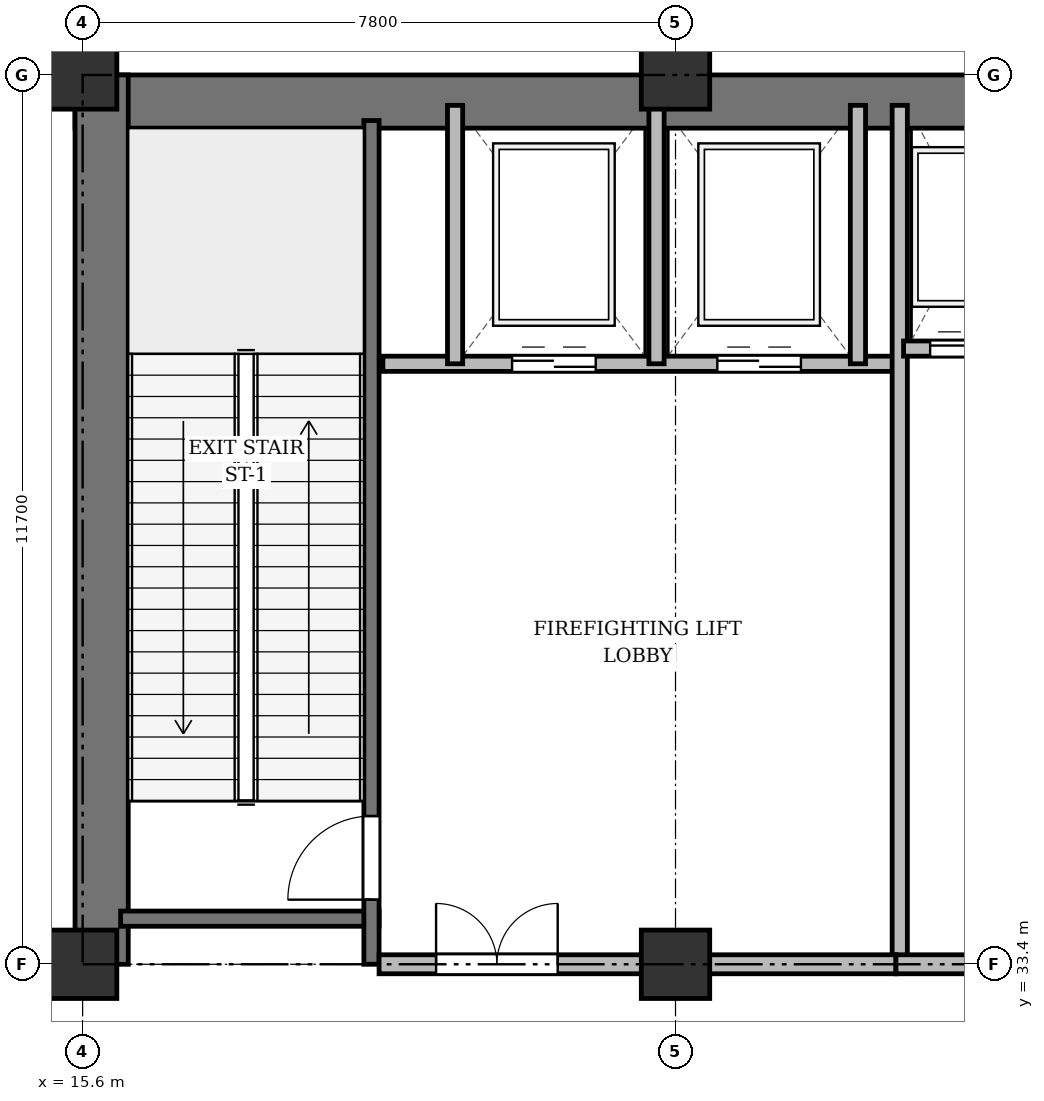
"""IFC4 building model, lengths in metres.
Left out: names, types, materials, properties, quantities, classifications, styles, units other than length and angle.
Written with IfcOpenShell. Run it as: python <this file> out.ifc"""

import sys

from ifc_helpers import new_model, si_unit, direction, frame, frame_2d, origin, origin_2d, place, context, subcontext, project, spatial, rectangle, extrude, source, transform, mapped, element, fill, save


model = new_model("IFC4")
c1 = context("Model", 3, precision=1e-05, world=origin(), true_north=direction((0.0, 1.0)))
c2 = subcontext(c1, "Body", "Model", "MODEL_VIEW")
j1 = project(units=[si_unit("LENGTHUNIT", "METRE"), si_unit("PLANEANGLEUNIT", "RADIAN")], contexts=[c1])
p1 = place(None, origin())
s1 = spatial("IfcSite", under=j1, at=p1, CompositionType="ELEMENT")
p2 = place(p1, origin())
s2 = spatial("IfcBuilding", under=s1, at=p2, CompositionType="ELEMENT")
p3 = place(p2, frame((0.0, 0.0, 73.9)))
s3 = spatial("IfcBuildingStorey", under=s2, at=p3, CompositionType="ELEMENT", Elevation=73.9)
m1 = source(origin(), c2, "Body", "SweptSolid", [
    extrude(rectangle(XDim=0.9, YDim=0.9, at=origin_2d()), origin(), (0.0, 0.0, 1.0), 7.8),
])
for number, where, z_axis, x_axis in (
    (1, (15.6, 33.4, 0.0), (0.0, 0.0, 1.0), (1.0, 0.0, 0.0)),
    (2, (15.6, 45.1, 0.0), (0.0, 0.0, 1.0), (1.0, 0.0, 0.0)),
    (3, (23.4, 33.4, 0.0), (0.0, 0.0, 1.0), (1.0, 0.0, 0.0)),
    (4, (23.4, 45.1, 0.0), (0.0, 0.0, 1.0), (1.0, 0.0, 0.0)),
):
    element("IfcColumn", number, at=place(p3, frame(where, z_axis=z_axis, x_axis=x_axis)), inside=s3, PredefinedType="COLUMN", context=c2, shape_type="MappedRepresentation", body=[
        mapped(m1, transform((0.0, 0.0, 0.0), x_axis=(1.0, 0.0, 0.0), y_axis=(0.0, 1.0, 0.0), z_axis=(0.0, 0.0, 1.0), scale=1.0)),
    ])
p4 = place(p3, frame((15.5, 44.75, 0.0), z_axis=(0.0, 0.0, 1.0), x_axis=(1.0, 0.0, 0.0)))
e5 = element("IfcWall", 5, at=p4, inside=s3, PredefinedType="SHEAR", context=c2, shape_type="SweptSolid", body=[
    extrude(rectangle(XDim=43.4, YDim=0.7, at=frame_2d((21.7, 0.0))), origin(), (0.0, 0.0, 1.0), 7.42),
])
p5 = place(p3, frame((15.85, 33.4, 0.0), z_axis=(0.0, 0.0, 1.0), x_axis=(0.0, 1.0, 0.0)))
e6 = element("IfcWall", 6, at=p5, inside=s3, PredefinedType="SHEAR", context=c2, shape_type="SweptSolid", body=[
    extrude(rectangle(XDim=11.7, YDim=0.7, at=frame_2d((5.85, 0.0))), origin(), (0.0, 0.0, 1.0), 7.42),
])
p6 = place(p3, frame((16.1, 34.0, 0.0), z_axis=(0.0, 0.0, 1.0), x_axis=(1.0, 0.0, 0.0)))
e7 = element("IfcWall", 7, at=p6, inside=s3, PredefinedType="SHEAR", context=c2, shape_type="SweptSolid", body=[
    extrude(rectangle(XDim=3.4, YDim=0.2, at=frame_2d((1.7, 0.0))), origin(), (0.0, 0.0, 1.0), 7.42),
])
p7 = place(p3, frame((19.4, 33.4, 0.0), z_axis=(0.0, 0.0, 1.0), x_axis=(0.0, 1.0, 0.0)))
e8 = element("IfcWall", 8, at=p7, inside=s3, PredefinedType="SHEAR", context=c2, shape_type="SweptSolid", body=[
    extrude(rectangle(XDim=11.1, YDim=0.2, at=frame_2d((5.55, 0.0))), origin(), (0.0, 0.0, 1.0), 7.42),
])
p8 = place(p7, frame((0.85, 0.0, 0.0)))
e9 = element("IfcOpeningElement", 9, at=p8, cuts=e8, PredefinedType="OPENING", context=c2, shape_type="SweptSolid", body=[
    extrude(rectangle(XDim=1.1, YDim=2.15, at=frame_2d((0.55, 1.075))), frame((0.0, 0.11, 0.0), z_axis=(0.0, -1.0, 0.0), x_axis=(1.0, 0.0, 0.0)), (0.0, 0.0, 1.0), 0.22),
])
p9 = place(p3, frame((19.55, 41.3, 0.0), z_axis=(0.0, 0.0, 1.0), x_axis=(1.0, 0.0, 0.0)))
e10 = element("IfcWall", 10, at=p9, inside=s3, PredefinedType="SOLIDWALL", context=c2, shape_type="SweptSolid", body=[
    extrude(rectangle(XDim=6.75, YDim=0.2, at=frame_2d((3.375, 0.0))), origin(), (0.0, 0.0, 1.0), 7.42),
])
p10 = place(p9, frame((1.7, 0.0, 0.0)))
e11 = element("IfcOpeningElement", 11, at=p10, cuts=e10, PredefinedType="OPENING", context=c2, shape_type="SweptSolid", body=[
    extrude(rectangle(XDim=1.1, YDim=2.15, at=frame_2d((0.55, 1.075))), frame((0.0, 0.11, 0.0), z_axis=(0.0, -1.0, 0.0), x_axis=(1.0, 0.0, 0.0)), (0.0, 0.0, 1.0), 0.22),
])
p11 = place(p9, frame((4.4, 0.0, 0.0)))
e12 = element("IfcOpeningElement", 12, at=p11, cuts=e10, PredefinedType="OPENING", context=c2, shape_type="SweptSolid", body=[
    extrude(rectangle(XDim=1.1, YDim=2.15, at=frame_2d((0.55, 1.075))), frame((0.0, 0.11, 0.0), z_axis=(0.0, -1.0, 0.0), x_axis=(1.0, 0.0, 0.0)), (0.0, 0.0, 1.0), 0.22),
])
for number, where, z_axis, x_axis in (
    (13, (20.5, 41.3, 0.0), (0.0, 0.0, 1.0), (0.0, 1.0, 0.0)),
    (14, (23.15, 41.3, 0.0), (0.0, 0.0, 1.0), (0.0, 1.0, 0.0)),
    (15, (25.8, 41.3, 0.0), (0.0, 0.0, 1.0), (0.0, 1.0, 0.0)),
):
    element("IfcWall", number, at=place(p3, frame(where, z_axis=z_axis, x_axis=x_axis)), inside=s3, PredefinedType="SOLIDWALL", context=c2, shape_type="SweptSolid", body=[
        extrude(rectangle(XDim=3.4, YDim=0.2, at=frame_2d((1.7, 0.0))), origin(), (0.0, 0.0, 1.0), 7.42),
    ])
p12 = place(p3, frame((26.35, 33.4, 0.0), z_axis=(0.0, 0.0, 1.0), x_axis=(0.0, 1.0, 0.0)))
e16 = element("IfcWall", 16, at=p12, inside=s3, PredefinedType="SOLIDWALL", context=c2, shape_type="SweptSolid", body=[
    extrude(rectangle(XDim=11.3, YDim=0.2, at=frame_2d((5.65, 0.0))), origin(), (0.0, 0.0, 1.0), 6.77),
])
p13 = place(p3, frame((19.5, 33.4, 0.0), z_axis=(0.0, 0.0, 1.0), x_axis=(1.0, 0.0, 0.0)))
e17 = element("IfcWall", 17, at=p13, inside=s3, PredefinedType="PARTITIONING", context=c2, shape_type="SweptSolid", body=[
    extrude(rectangle(XDim=6.8, YDim=0.25, at=frame_2d((3.4, 0.0))), origin(), (0.0, 0.0, 1.0), 6.77),
])
p14 = place(p13, frame((0.75, 0.0, 0.0)))
e18 = element("IfcOpeningElement", 18, at=p14, cuts=e17, PredefinedType="OPENING", context=c2, shape_type="SweptSolid", body=[
    extrude(rectangle(XDim=1.6, YDim=2.2, at=frame_2d((0.8, 1.1))), frame((0.0, 0.135, 0.0), z_axis=(0.0, -1.0, 0.0), x_axis=(1.0, 0.0, 0.0)), (0.0, 0.0, 1.0), 0.27),
])
p15 = place(p3, frame((26.4, 41.5, 0.0), z_axis=(0.0, 0.0, 1.0), x_axis=(1.0, 0.0, 0.0)))
e19 = element("IfcWall", 19, at=p15, inside=s3, PredefinedType="SOLIDWALL", context=c2, shape_type="SweptSolid", body=[
    extrude(rectangle(XDim=6.95, YDim=0.2, at=frame_2d((3.475, 0.0))), origin(), (0.0, 0.0, 1.0), 7.42),
])
p16 = place(p15, frame((0.35, 0.0, 0.0)))
e20 = element("IfcOpeningElement", 20, at=p16, cuts=e19, PredefinedType="OPENING", context=c2, shape_type="SweptSolid", body=[
    extrude(rectangle(XDim=1.05, YDim=2.15, at=frame_2d((0.525, 1.075))), frame((0.0, 0.11, 0.0), z_axis=(0.0, -1.0, 0.0), x_axis=(1.0, 0.0, 0.0)), (0.0, 0.0, 1.0), 0.22),
])
p17 = place(p15, frame((2.05, 0.0, 0.0)))
e21 = element("IfcOpeningElement", 21, at=p17, cuts=e19, PredefinedType="OPENING", context=c2, shape_type="SweptSolid", body=[
    extrude(rectangle(XDim=1.05, YDim=2.15, at=frame_2d((0.525, 1.075))), frame((0.0, 0.11, 0.0), z_axis=(0.0, -1.0, 0.0), x_axis=(1.0, 0.0, 0.0)), (0.0, 0.0, 1.0), 0.22),
])
p18 = place(p15, frame((3.75, 0.0, 0.0)))
e22 = element("IfcOpeningElement", 22, at=p18, cuts=e19, PredefinedType="OPENING", context=c2, shape_type="SweptSolid", body=[
    extrude(rectangle(XDim=1.05, YDim=2.15, at=frame_2d((0.525, 1.075))), frame((0.0, 0.11, 0.0), z_axis=(0.0, -1.0, 0.0), x_axis=(1.0, 0.0, 0.0)), (0.0, 0.0, 1.0), 0.22),
])
p19 = place(p15, frame((5.45, 0.0, 0.0)))
e23 = element("IfcOpeningElement", 23, at=p19, cuts=e19, PredefinedType="OPENING", context=c2, shape_type="SweptSolid", body=[
    extrude(rectangle(XDim=1.05, YDim=2.15, at=frame_2d((0.525, 1.075))), frame((0.0, 0.11, 0.0), z_axis=(0.0, -1.0, 0.0), x_axis=(1.0, 0.0, 0.0)), (0.0, 0.0, 1.0), 0.22),
])
p20 = place(p3, frame((26.3, 33.4, 0.0), z_axis=(0.0, 0.0, 1.0), x_axis=(1.0, 0.0, 0.0)))
e24 = element("IfcWall", 24, at=p20, inside=s3, PredefinedType="PARTITIONING", context=c2, shape_type="SweptSolid", body=[
    extrude(rectangle(XDim=20.85, YDim=0.25, at=frame_2d((10.425, 0.0))), origin(), (0.0, 0.0, 1.0), 6.77),
])
p21 = place(p20, frame((9.2, 0.0, 0.0)))
e25 = element("IfcOpeningElement", 25, at=p21, cuts=e24, PredefinedType="OPENING", context=c2, shape_type="SweptSolid", body=[
    extrude(rectangle(XDim=1.6, YDim=2.2, at=frame_2d((0.8, 1.1))), frame((0.0, 0.135, 0.0), z_axis=(0.0, -1.0, 0.0), x_axis=(1.0, 0.0, 0.0)), (0.0, 0.0, 1.0), 0.27),
])
m2 = source(origin(), c2, "Body", "SweptSolid", [
    extrude(rectangle(XDim=1.1, YDim=2.15, at=frame_2d((0.55, 1.075))), frame((0.0, 0.025, 0.0), z_axis=(0.0, -1.0, 0.0), x_axis=(1.0, 0.0, 0.0)), (0.0, 0.0, 1.0), 0.05),
])
p22 = place(p8, origin())
e26 = element("IfcDoor", 26, at=p22, inside=s3, OperationType="SINGLE_SWING_LEFT", PredefinedType="DOOR", context=c2, shape_type="MappedRepresentation", body=[
    mapped(m2, transform((0.0, 0.0, 0.0), x_axis=(1.0, 0.0, 0.0), y_axis=(0.0, 1.0, 0.0), z_axis=(0.0, 0.0, 1.0), scale=1.0)),
])
fill(e9, e26)
p23 = place(p10, origin())
e27 = element("IfcDoor", 27, at=p23, inside=s3, OperationType="DOUBLE_DOOR_SLIDING", PredefinedType="DOOR", context=c2, shape_type="MappedRepresentation", body=[
    mapped(m2, transform((0.0, 0.0, 0.0), x_axis=(1.0, 0.0, 0.0), y_axis=(0.0, 1.0, 0.0), z_axis=(0.0, 0.0, 1.0), scale=1.0)),
])
fill(e11, e27)
p24 = place(p11, origin())
e28 = element("IfcDoor", 28, at=p24, inside=s3, OperationType="DOUBLE_DOOR_SLIDING", PredefinedType="DOOR", context=c2, shape_type="MappedRepresentation", body=[
    mapped(m2, transform((0.0, 0.0, 0.0), x_axis=(1.0, 0.0, 0.0), y_axis=(0.0, 1.0, 0.0), z_axis=(0.0, 0.0, 1.0), scale=1.0)),
])
fill(e12, e28)
m3 = source(origin(), c2, "Body", "SweptSolid", [
    extrude(rectangle(XDim=1.6, YDim=2.2, at=frame_2d((0.8, 1.1))), frame((0.0, 0.025, 0.0), z_axis=(0.0, -1.0, 0.0), x_axis=(1.0, 0.0, 0.0)), (0.0, 0.0, 1.0), 0.05),
])
p25 = place(p14, origin())
e29 = element("IfcDoor", 29, at=p25, inside=s3, OperationType="DOUBLE_DOOR_SINGLE_SWING", PredefinedType="DOOR", context=c2, shape_type="MappedRepresentation", body=[
    mapped(m3, transform((0.0, 0.0, 0.0), x_axis=(1.0, 0.0, 0.0), y_axis=(0.0, 1.0, 0.0), z_axis=(0.0, 0.0, 1.0), scale=1.0)),
])
fill(e18, e29)
m4 = source(origin(), c2, "Body", "SweptSolid", [
    extrude(rectangle(XDim=1.05, YDim=2.15, at=frame_2d((0.525, 1.075))), frame((0.0, 0.025, 0.0), z_axis=(0.0, -1.0, 0.0), x_axis=(1.0, 0.0, 0.0)), (0.0, 0.0, 1.0), 0.05),
])
p26 = place(p16, origin())
e30 = element("IfcDoor", 30, at=p26, inside=s3, OperationType="DOUBLE_DOOR_SLIDING", PredefinedType="DOOR", context=c2, shape_type="MappedRepresentation", body=[
    mapped(m4, transform((0.0, 0.0, 0.0), x_axis=(1.0, 0.0, 0.0), y_axis=(0.0, 1.0, 0.0), z_axis=(0.0, 0.0, 1.0), scale=1.0)),
])
fill(e20, e30)
save(model, sys.argv[1])
